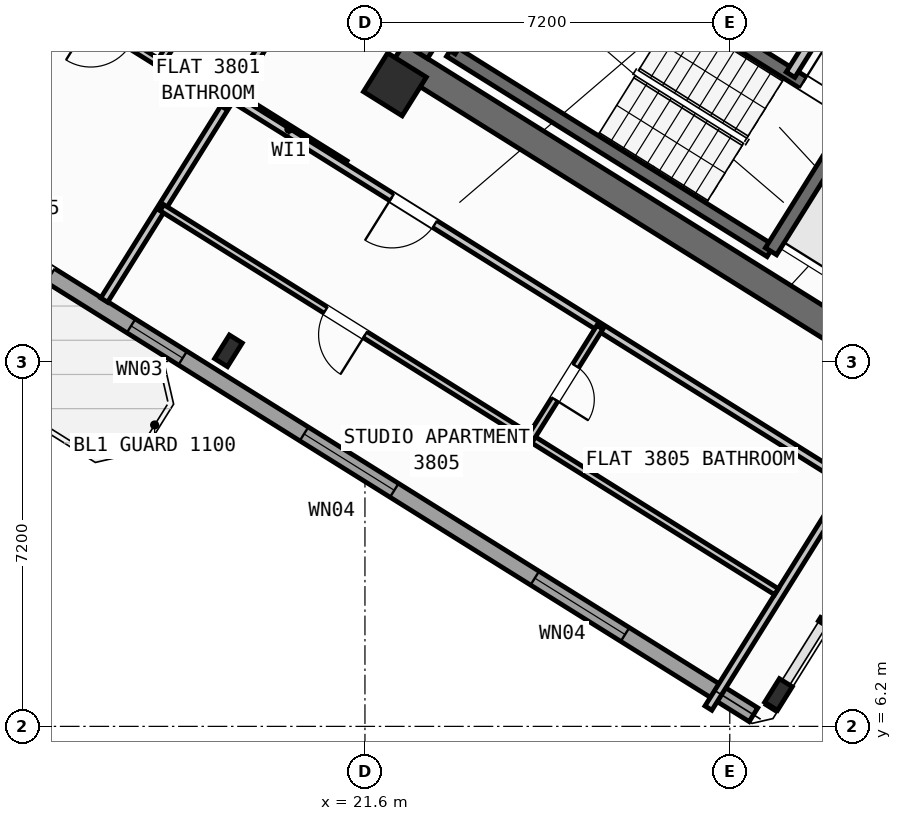
"""IFC4 building model, lengths in metres.
Left out: names, types, materials, properties, quantities, classifications, styles, units other than length and angle.
Written with IfcOpenShell. Run it as: python <this file> out.ifc"""

import sys

from ifc_helpers import new_model, si_unit, direction, frame, frame_2d, origin, origin_2d, place, context, subcontext, project, spatial, rectangle, hollow_rectangle, i_section, extrude, source, transform, mapped, element, fill, save


model = new_model("IFC4")
c1 = context("Model", 3, precision=1e-05, world=origin(), true_north=direction((0.0, 1.0)))
c2 = subcontext(c1, "Body", "Model", "MODEL_VIEW")
j1 = project(units=[si_unit("LENGTHUNIT", "METRE"), si_unit("PLANEANGLEUNIT", "RADIAN")], contexts=[c1])
p1 = place(None, origin())
s1 = spatial("IfcSite", under=j1, at=p1, CompositionType="ELEMENT")
p2 = place(p1, origin())
s2 = spatial("IfcBuilding", under=s1, at=p2, CompositionType="ELEMENT")
p3 = place(p2, frame((0.0, 0.0, 151.5)))
s3 = spatial("IfcBuildingStorey", under=s2, at=p3, CompositionType="ELEMENT", Elevation=151.5)
p4 = place(p3, frame((33.366, 12.477, 0.0), z_axis=(0.0, 0.0, 1.0), x_axis=(-0.848047359947, 0.529920442413, 0.0)))
e1 = element("IfcWall", 1, at=p4, inside=s3, PredefinedType="SHEAR", context=c2, shape_type="SweptSolid", body=[
    extrude(rectangle(XDim=13.14, YDim=0.55, at=frame_2d((6.57, 0.0))), origin(), (0.0, 0.0, 1.0), 3.35),
])
p5 = place(p3, frame((26.007, 24.976, 0.0), z_axis=(0.0, 0.0, 1.0), x_axis=(-0.529923795287, -0.848045264823, 0.0)))
e2 = element("IfcWall", 2, at=p5, inside=s3, PredefinedType="SHEAR", context=c2, shape_type="SweptSolid", body=[
    extrude(rectangle(XDim=6.425, YDim=0.55, at=frame_2d((3.212, 0.0))), origin(), (0.0, 0.0, 1.0), 3.35),
])
m1 = source(origin(), c2, "Body", "SweptSolid", [
    extrude(i_section(OverallWidth=0.3, OverallDepth=0.55, WebThickness=0.015, FlangeThickness=0.029, at=origin_2d()), origin(), (0.0, 0.0, 1.0), 3.6),
])
p6 = place(p3, frame((29.761, 6.829, 0.0), z_axis=(0.0, 0.0, 1.0), x_axis=(-0.848048096156, 0.529919264233, 0.0)))
e3 = element("IfcColumn", 3, at=p6, inside=s3, PredefinedType="COLUMN", context=c2, shape_type="MappedRepresentation", body=[
    mapped(m1, transform((0.0, 0.0, 0.0), scale=1.0)),
])
m2 = source(origin(), c2, "Body", "SweptSolid", [
    extrude(hollow_rectangle(XDim=0.9, YDim=0.9, WallThickness=0.036, at=origin_2d()), origin(), (0.0, 0.0, 1.0), 3.6),
])
p7 = place(p3, frame((22.191, 18.87, 0.0), z_axis=(0.0, 0.0, 1.0), x_axis=(-0.848048096156, 0.529919264233, 0.0)))
e4 = element("IfcColumn", 4, at=p7, inside=s3, PredefinedType="COLUMN", context=c2, shape_type="MappedRepresentation", body=[
    mapped(m2, transform((0.0, 0.0, 0.0), scale=1.0)),
])
p8 = place(p3, frame((18.906, 13.612, 0.0), z_axis=(0.0, 0.0, 1.0), x_axis=(-0.848048096156, 0.529919264233, 0.0)))
e5 = element("IfcColumn", 5, at=p8, inside=s3, PredefinedType="COLUMN", context=c2, shape_type="MappedRepresentation", body=[
    mapped(m1, transform((0.0, 0.0, 0.0), scale=1.0)),
])
p9 = place(p3, frame((29.268, 6.429, 0.0), z_axis=(0.0, 0.0, 1.0), x_axis=(-0.848049971435, 0.529916263149, 0.0)))
e6 = element("IfcWall", 6, at=p9, inside=s3, PredefinedType="STANDARD", context=c2, shape_type="SweptSolid", body=[
    extrude(rectangle(XDim=31.588, YDim=0.32, at=frame_2d((15.794, 0.0))), origin(), (0.0, 0.0, 1.0), 3.35),
])
p10 = place(p9, frame((16.362, 0.0, 0.0)))
e7 = element("IfcOpeningElement", 7, at=p10, cuts=e6, PredefinedType="OPENING", context=c2, shape_type="SweptSolid", body=[
    extrude(rectangle(XDim=1.2, YDim=2.15, at=frame_2d((0.6, 1.075))), frame((0.0, 0.17, 0.0), z_axis=(0.0, -1.0, 0.0), x_axis=(1.0, 0.0, 0.0)), (0.0, 0.0, 1.0), 0.34),
])
p11 = place(p9, frame((2.989, 0.0, 0.8)))
e8 = element("IfcOpeningElement", 8, at=p11, cuts=e6, PredefinedType="OPENING", context=c2, shape_type="SweptSolid", body=[
    extrude(rectangle(XDim=2.1, YDim=1.55, at=frame_2d((1.05, 0.775))), frame((0.0, 0.17, 0.0), z_axis=(0.0, -1.0, 0.0), x_axis=(1.0, 0.0, 0.0)), (0.0, 0.0, 1.0), 0.34),
])
p12 = place(p9, frame((8.359, 0.0, 0.8)))
e9 = element("IfcOpeningElement", 9, at=p12, cuts=e6, PredefinedType="OPENING", context=c2, shape_type="SweptSolid", body=[
    extrude(rectangle(XDim=2.1, YDim=1.55, at=frame_2d((1.05, 0.775))), frame((0.0, 0.17, 0.0), z_axis=(0.0, -1.0, 0.0), x_axis=(1.0, 0.0, 0.0)), (0.0, 0.0, 1.0), 0.34),
])
p13 = place(p9, frame((13.284, 0.0, 0.95)))
e10 = element("IfcOpeningElement", 10, at=p13, cuts=e6, PredefinedType="OPENING", context=c2, shape_type="SweptSolid", body=[
    extrude(rectangle(XDim=1.2, YDim=1.4, at=frame_2d((0.6, 0.7))), frame((0.0, 0.17, 0.0), z_axis=(0.0, -1.0, 0.0), x_axis=(1.0, 0.0, 0.0)), (0.0, 0.0, 1.0), 0.34),
])
p14 = place(p9, frame((20.259, 0.0, 0.95)))
e11 = element("IfcOpeningElement", 11, at=p14, cuts=e6, PredefinedType="OPENING", context=c2, shape_type="SweptSolid", body=[
    extrude(rectangle(XDim=1.2, YDim=1.4, at=frame_2d((0.6, 0.7))), frame((0.0, 0.17, 0.0), z_axis=(0.0, -1.0, 0.0), x_axis=(1.0, 0.0, 0.0)), (0.0, 0.0, 1.0), 0.34),
])
p15 = place(p9, frame((22.929, 0.0, 0.95)))
e12 = element("IfcOpeningElement", 12, at=p15, cuts=e6, PredefinedType="OPENING", context=c2, shape_type="SweptSolid", body=[
    extrude(rectangle(XDim=1.2, YDim=1.4, at=frame_2d((0.6, 0.7))), frame((0.0, 0.17, 0.0), z_axis=(0.0, -1.0, 0.0), x_axis=(1.0, 0.0, 0.0)), (0.0, 0.0, 1.0), 0.34),
])
p16 = place(p9, frame((27.481, 0.0, 0.8)))
e13 = element("IfcOpeningElement", 13, at=p16, cuts=e6, PredefinedType="OPENING", context=c2, shape_type="SweptSolid", body=[
    extrude(rectangle(XDim=2.1, YDim=1.55, at=frame_2d((1.05, 0.775))), frame((0.0, 0.17, 0.0), z_axis=(0.0, -1.0, 0.0), x_axis=(1.0, 0.0, 0.0)), (0.0, 0.0, 1.0), 0.34),
])
p17 = place(p3, frame((29.605, 15.581, 0.0), z_axis=(0.0, 0.0, 1.0), x_axis=(-0.848036911448, 0.529937163087, 0.0)))
e14 = element("IfcWall", 14, at=p17, inside=s3, PredefinedType="SHEAR", context=c2, shape_type="SweptSolid", body=[
    extrude(rectangle(XDim=7.46, YDim=0.26, at=frame_2d((3.73, 0.0))), origin(), (0.0, 0.0, 1.0), 3.35),
])
p18 = place(p3, frame((31.28, 18.261, 0.0), z_axis=(0.0, 0.0, 1.0), x_axis=(-0.848051618787, 0.529913626805, 0.0)))
e15 = element("IfcWall", 15, at=p18, inside=s3, PredefinedType="SHEAR", context=c2, shape_type="SweptSolid", body=[
    extrude(rectangle(XDim=7.46, YDim=0.26, at=frame_2d((3.73, 0.0))), origin(), (0.0, 0.0, 1.0), 3.35),
])
p19 = place(p18, frame((0.36, 0.0, 0.0)))
e16 = element("IfcOpeningElement", 16, at=p19, cuts=e15, PredefinedType="OPENING", context=c2, shape_type="SweptSolid", body=[
    extrude(rectangle(XDim=0.86, YDim=2.05, at=frame_2d((0.43, 1.025))), frame((0.0, 0.14, 0.0), z_axis=(0.0, -1.0, 0.0), x_axis=(1.0, 0.0, 0.0)), (0.0, 0.0, 1.0), 0.28),
])
p20 = place(p3, frame((31.288, 18.256, 0.0), z_axis=(0.0, 0.0, 1.0), x_axis=(-0.529943379326, -0.848033026897, 0.0)))
e17 = element("IfcWall", 17, at=p20, inside=s3, PredefinedType="SHEAR", context=c2, shape_type="SweptSolid", body=[
    extrude(rectangle(XDim=3.16, YDim=0.26, at=frame_2d((1.58, 0.0))), origin(), (0.0, 0.0, 1.0), 3.35),
])
p21 = place(p3, frame((24.945, 22.22, 0.0), z_axis=(0.0, 0.0, 1.0), x_axis=(-0.529908658664, -0.84805472316, 0.0)))
e18 = element("IfcWall", 18, at=p21, inside=s3, PredefinedType="SHEAR", context=c2, shape_type="SweptSolid", body=[
    extrude(rectangle(XDim=3.16, YDim=0.26, at=frame_2d((1.58, 0.0))), origin(), (0.0, 0.0, 1.0), 3.35),
])
p22 = place(p3, frame((31.525, 21.504, 0.0), z_axis=(0.0, 0.0, 1.0), x_axis=(-0.529907497854, -0.848055448493, 0.0)))
e19 = element("IfcWall", 19, at=p22, inside=s3, PredefinedType="STANDARD", context=c2, shape_type="SweptSolid", body=[
    extrude(rectangle(XDim=2.88, YDim=0.2, at=frame_2d((1.44, 0.0))), origin(), (0.0, 0.0, 1.0), 3.34),
])
p23 = place(p3, frame((21.206, 17.292, 0.0), z_axis=(0.0, 0.0, 1.0), x_axis=(-0.848050851465, 0.529914854792, 0.0)))
e20 = element("IfcWall", 20, at=p23, inside=s3, PredefinedType="PARTITIONING", context=c2, shape_type="SweptSolid", body=[
    extrude(rectangle(XDim=2.61, YDim=0.16, at=frame_2d((1.305, 0.0))), origin(), (0.0, 0.0, 1.0), 3.34),
])
p24 = place(p3, frame((20.719, 21.44, 0.0), z_axis=(0.0, 0.0, 1.0), x_axis=(-0.529906246318, -0.848056230514, 0.0)))
e21 = element("IfcWall", 21, at=p24, inside=s3, PredefinedType="PARTITIONING", context=c2, shape_type="SweptSolid", body=[
    extrude(rectangle(XDim=8.05, YDim=0.16, at=frame_2d((4.025, 0.0))), origin(), (0.0, 0.0, 1.0), 3.34),
])
p25 = place(p3, frame((16.519, 21.87, 0.0), z_axis=(0.0, 0.0, 1.0), x_axis=(-0.529922447305, -0.848046107144, 0.0)))
e22 = element("IfcWall", 22, at=p25, inside=s3, PredefinedType="PARTITIONING", context=c2, shape_type="SweptSolid", body=[
    extrude(rectangle(XDim=5.451, YDim=0.16, at=frame_2d((2.726, 0.0))), origin(), (0.0, 0.0, 1.0), 2.775),
])
p26 = place(p3, frame((18.86, 18.464, 0.0), z_axis=(0.0, 0.0, 1.0), x_axis=(-0.848059820872, 0.529900500304, 0.0)))
e23 = element("IfcWall", 23, at=p26, inside=s3, PredefinedType="PLUMBINGWALL", context=c2, shape_type="SweptSolid", body=[
    extrude(rectangle(XDim=3.79, YDim=0.14, at=frame_2d((1.895, 0.0))), origin(), (0.0, 0.0, 1.0), 3.34),
])
p27 = place(p26, frame((2.23, 0.0, 0.0)))
e24 = element("IfcOpeningElement", 24, at=p27, cuts=e23, PredefinedType="OPENING", context=c2, shape_type="SweptSolid", body=[
    extrude(rectangle(XDim=0.92, YDim=2.08, at=frame_2d((0.46, 1.04))), frame((0.0, 0.08, 0.0), z_axis=(0.0, -1.0, 0.0), x_axis=(1.0, 0.0, 0.0)), (0.0, 0.0, 1.0), 0.16),
])
p28 = place(p3, frame((19.405, 22.261, 0.0), z_axis=(0.0, 0.0, 1.0), x_axis=(-0.529898896701, -0.848060822863, 0.0)))
e25 = element("IfcWall", 25, at=p28, inside=s3, PredefinedType="PLUMBINGWALL", context=c2, shape_type="SweptSolid", body=[
    extrude(rectangle(XDim=3.51, YDim=0.14, at=frame_2d((1.755, 0.0))), origin(), (0.0, 0.0, 1.0), 2.995),
])
p29 = place(p28, frame((1.365, 0.0, 0.0)))
e26 = element("IfcOpeningElement", 26, at=p29, cuts=e25, PredefinedType="OPENING", context=c2, shape_type="SweptSolid", body=[
    extrude(rectangle(XDim=0.78, YDim=2.05, at=frame_2d((0.39, 1.025))), frame((0.0, 0.08, 0.0), z_axis=(0.0, -1.0, 0.0), x_axis=(1.0, 0.0, 0.0)), (0.0, 0.0, 1.0), 0.16),
])
p30 = place(p3, frame((32.164, 10.374, 0.0), z_axis=(0.0, 0.0, 1.0), x_axis=(-0.848044107957, 0.529925646633, 0.0)))
e27 = element("IfcWall", 27, at=p30, inside=s3, PredefinedType="PARTITIONING", context=c2, shape_type="SweptSolid", body=[
    extrude(rectangle(XDim=15.57, YDim=0.16, at=frame_2d((7.785, 0.0))), origin(), (0.0, 0.0, 1.0), 3.34),
])
p31 = place(p30, frame((10.83, 0.0, 0.0)))
e28 = element("IfcOpeningElement", 28, at=p31, cuts=e27, PredefinedType="OPENING", context=c2, shape_type="SweptSolid", body=[
    extrude(rectangle(XDim=1.0, YDim=2.1, at=frame_2d((0.5, 1.05))), frame((0.0, 0.09, 0.0), z_axis=(0.0, -1.0, 0.0), x_axis=(1.0, 0.0, 0.0)), (0.0, 0.0, 1.0), 0.18),
])
p32 = place(p3, frame((31.282, 11.208, 0.0), z_axis=(0.0, 0.0, 1.0), x_axis=(-0.529938869374, -0.84803584519, 0.0)))
e29 = element("IfcWall", 29, at=p32, inside=s3, PredefinedType="PARTITIONING", context=c2, shape_type="SweptSolid", body=[
    extrude(rectangle(XDim=5.48, YDim=0.16, at=frame_2d((2.74, 0.0))), origin(), (0.0, 0.0, 1.0), 3.34),
])
p33 = place(p3, frame((29.72, 8.859, 0.0), z_axis=(0.0, 0.0, 1.0), x_axis=(-0.848049134363, 0.529917602752, 0.0)))
e30 = element("IfcWall", 30, at=p33, inside=s3, PredefinedType="PLUMBINGWALL", context=c2, shape_type="SweptSolid", body=[
    extrude(rectangle(XDim=14.3, YDim=0.14, at=frame_2d((7.15, 0.0))), origin(), (0.0, 0.0, 1.0), 3.34),
])
p34 = place(p33, frame((9.57, 0.0, 0.0)))
e31 = element("IfcOpeningElement", 31, at=p34, cuts=e30, PredefinedType="OPENING", context=c2, shape_type="SweptSolid", body=[
    extrude(rectangle(XDim=0.92, YDim=2.08, at=frame_2d((0.46, 1.04))), frame((0.0, 0.08, 0.0), z_axis=(0.0, -1.0, 0.0), x_axis=(1.0, 0.0, 0.0)), (0.0, 0.0, 1.0), 0.16),
])
p35 = place(p3, frame((26.237, 14.078, 0.0), z_axis=(0.0, 0.0, 1.0), x_axis=(-0.52995640672, -0.848024885824, 0.0)))
e32 = element("IfcWall", 32, at=p35, inside=s3, PredefinedType="PLUMBINGWALL", context=c2, shape_type="SweptSolid", body=[
    extrude(rectangle(XDim=2.58, YDim=0.14, at=frame_2d((1.29, 0.0))), origin(), (0.0, 0.0, 1.0), 3.34),
])
p36 = place(p35, frame((0.9, 0.0, 0.0)))
e33 = element("IfcOpeningElement", 33, at=p36, cuts=e32, PredefinedType="OPENING", context=c2, shape_type="SweptSolid", body=[
    extrude(rectangle(XDim=0.78, YDim=2.05, at=frame_2d((0.39, 1.025))), frame((0.0, 0.08, 0.0), z_axis=(0.0, -1.0, 0.0), x_axis=(1.0, 0.0, 0.0)), (0.0, 0.0, 1.0), 0.16),
])
m3 = source(origin(), c2, "Body", "SweptSolid", [
    extrude(rectangle(XDim=2.1, YDim=1.55, at=frame_2d((1.05, 0.775))), frame((0.0, 0.03, 0.0), z_axis=(0.0, -1.0, 0.0), x_axis=(1.0, 0.0, 0.0)), (0.0, 0.0, 1.0), 0.06),
])
p37 = place(p11, origin())
e34 = element("IfcWindow", 34, at=p37, inside=s3, PartitioningType="SINGLE_PANEL", PredefinedType="WINDOW", context=c2, shape_type="MappedRepresentation", body=[
    mapped(m3, transform((0.0, 0.0, 0.0), scale=1.0)),
])
fill(e8, e34)
p38 = place(p12, origin())
e35 = element("IfcWindow", 35, at=p38, inside=s3, PartitioningType="SINGLE_PANEL", PredefinedType="WINDOW", context=c2, shape_type="MappedRepresentation", body=[
    mapped(m3, transform((0.0, 0.0, 0.0), scale=1.0)),
])
fill(e9, e35)
m4 = source(origin(), c2, "Body", "SweptSolid", [
    extrude(rectangle(XDim=1.2, YDim=1.4, at=frame_2d((0.6, 0.7))), frame((0.0, 0.03, 0.0), z_axis=(0.0, -1.0, 0.0), x_axis=(1.0, 0.0, 0.0)), (0.0, 0.0, 1.0), 0.06),
])
p39 = place(p13, origin())
e36 = element("IfcWindow", 36, at=p39, inside=s3, PartitioningType="SINGLE_PANEL", PredefinedType="WINDOW", context=c2, shape_type="MappedRepresentation", body=[
    mapped(m4, transform((0.0, 0.0, 0.0), scale=1.0)),
])
fill(e10, e36)
m5 = source(origin(), c2, "Body", "SweptSolid", [
    extrude(rectangle(XDim=0.86, YDim=2.05, at=frame_2d((0.43, 1.025))), frame((0.0, 0.025, 0.0), z_axis=(0.0, -1.0, 0.0), x_axis=(1.0, 0.0, 0.0)), (0.0, 0.0, 1.0), 0.05),
])
p40 = place(p19, frame((0.86, 0.0, 0.0), z_axis=(0.0, 0.0, 1.0), x_axis=(-1.0, 0.0, 0.0)))
e37 = element("IfcDoor", 37, at=p40, inside=s3, OperationType="SINGLE_SWING_LEFT", PredefinedType="DOOR", context=c2, shape_type="MappedRepresentation", body=[
    mapped(m5, transform((0.0, 0.0, 0.0), scale=1.0)),
])
fill(e16, e37)
m6 = source(origin(), c2, "Body", "SweptSolid", [
    extrude(rectangle(XDim=1.0, YDim=2.1, at=frame_2d((0.5, 1.05))), frame((0.0, 0.025, 0.0), z_axis=(0.0, -1.0, 0.0), x_axis=(1.0, 0.0, 0.0)), (0.0, 0.0, 1.0), 0.05),
])
p41 = place(p31, origin())
e38 = element("IfcDoor", 38, at=p41, inside=s3, OperationType="SINGLE_SWING_RIGHT", PredefinedType="DOOR", context=c2, shape_type="MappedRepresentation", body=[
    mapped(m6, transform((0.0, 0.0, 0.0), scale=1.0)),
])
fill(e28, e38)
m7 = source(origin(), c2, "Body", "SweptSolid", [
    extrude(rectangle(XDim=0.92, YDim=2.08, at=frame_2d((0.46, 1.04))), frame((0.0, 0.025, 0.0), z_axis=(0.0, -1.0, 0.0), x_axis=(1.0, 0.0, 0.0)), (0.0, 0.0, 1.0), 0.05),
])
p42 = place(p34, origin())
e39 = element("IfcDoor", 39, at=p42, inside=s3, OperationType="SINGLE_SWING_LEFT", PredefinedType="DOOR", context=c2, shape_type="MappedRepresentation", body=[
    mapped(m7, transform((0.0, 0.0, 0.0), scale=1.0)),
])
fill(e31, e39)
m8 = source(origin(), c2, "Body", "SweptSolid", [
    extrude(rectangle(XDim=0.78, YDim=2.05, at=frame_2d((0.39, 1.025))), frame((0.0, 0.025, 0.0), z_axis=(0.0, -1.0, 0.0), x_axis=(1.0, 0.0, 0.0)), (0.0, 0.0, 1.0), 0.05),
])
p43 = place(p36, origin())
e40 = element("IfcDoor", 40, at=p43, inside=s3, OperationType="SINGLE_SWING_RIGHT", PredefinedType="DOOR", context=c2, shape_type="MappedRepresentation", body=[
    mapped(m8, transform((0.0, 0.0, 0.0), scale=1.0)),
])
fill(e33, e40)
save(model, sys.argv[1])
